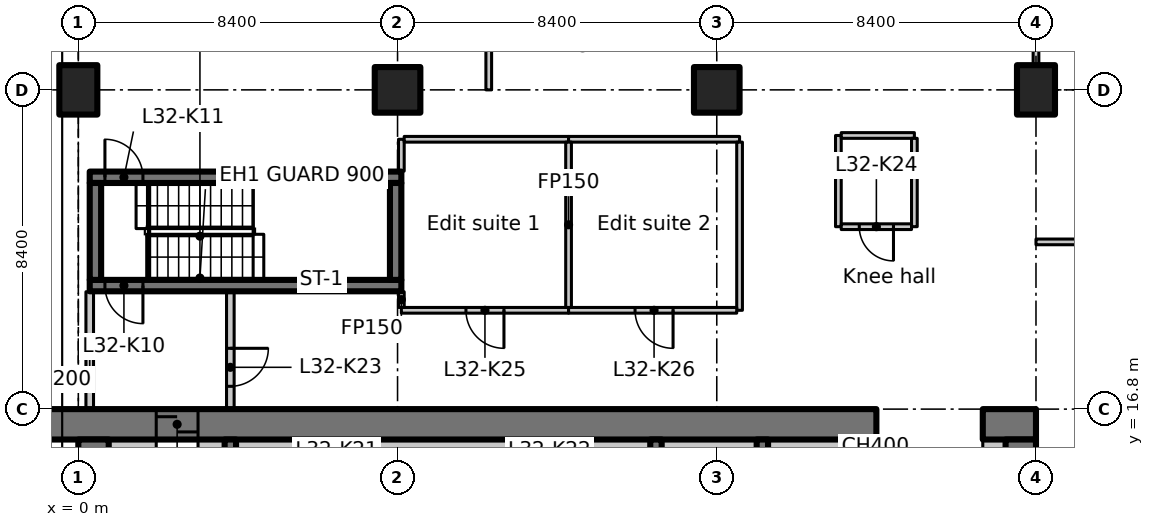
"""IFC4 building model, lengths in metres.
Left out: names, types, materials, properties, quantities, classifications, styles, units other than length and angle.
Written with IfcOpenShell. Run it as: python <this file> out.ifc"""

import sys

from ifc_helpers import new_model, si_unit, direction, frame, frame_2d, origin, origin_2d, place, context, subcontext, project, spatial, polyline, rectangle, outline, extrude, element, fill, save


model = new_model("IFC4")
c1 = context("Model", 3, precision=1e-05, world=origin(), true_north=direction((0.0, 1.0)))
c2 = subcontext(c1, "Body", "Model", "MODEL_VIEW")
j1 = project(units=[si_unit("LENGTHUNIT", "METRE"), si_unit("PLANEANGLEUNIT", "RADIAN")], contexts=[c1])
p1 = place(None, origin())
s1 = spatial("IfcSite", under=j1, at=p1, CompositionType="ELEMENT")
p2 = place(p1, origin())
s2 = spatial("IfcBuilding", under=s1, at=p2, CompositionType="ELEMENT")
p3 = place(p2, frame((0.0, 0.0, 131.3)))
s3 = spatial("IfcBuildingStorey", under=s2, at=p3, CompositionType="ELEMENT", Elevation=131.3)
p4 = place(p3, frame((0.0, 25.2, 0.0), z_axis=(0.0, 0.0, 1.0), x_axis=(1.0, 0.0, 0.0)))
e1 = element("IfcColumn", 1, at=p4, inside=s3, PredefinedType="COLUMN", context=c2, shape_type="SweptSolid", body=[
    extrude(rectangle(XDim=1.0, YDim=1.3, at=origin_2d()), origin(), (0.0, 0.0, 1.0), 3.35),
])
for number, where, z_axis, x_axis in (
    (2, (8.4, 25.2, 0.0), (0.0, 0.0, 1.0), (1.0, 0.0, 0.0)),
    (3, (16.8, 25.2, 0.0), (0.0, 0.0, 1.0), (1.0, 0.0, 0.0)),
):
    element("IfcColumn", number, at=place(p3, frame(where, z_axis=z_axis, x_axis=x_axis)), inside=s3, PredefinedType="COLUMN", context=c2, shape_type="SweptSolid", body=[
        extrude(rectangle(XDim=1.2, YDim=1.2, at=origin_2d()), origin(), (0.0, 0.0, 1.0), 3.35),
    ])
p5 = place(p3, frame((25.2, 25.2, 0.0), z_axis=(0.0, 0.0, 1.0), x_axis=(1.0, 0.0, 0.0)))
e4 = element("IfcColumn", 4, at=p5, inside=s3, PredefinedType="COLUMN", context=c2, shape_type="SweptSolid", body=[
    extrude(rectangle(XDim=1.0, YDim=1.3, at=origin_2d()), origin(), (0.0, 0.0, 1.0), 3.35),
])
p6 = place(p3, frame((-1.1, 16.4, 0.0), z_axis=(0.0, 0.0, 1.0), x_axis=(1.0, 0.0, 0.0)))
e5 = element("IfcWall", 5, at=p6, inside=s3, PredefinedType="SHEAR", context=c2, shape_type="SweptSolid", body=[
    extrude(rectangle(XDim=22.1, YDim=0.8, at=frame_2d((11.05, 0.0))), origin(), (0.0, 0.0, 1.0), 3.35),
])
p7 = place(p6, frame((3.15, 0.0, 0.0)))
e6 = element("IfcOpeningElement", 6, at=p7, cuts=e5, PredefinedType="OPENING", context=c2, shape_type="SweptSolid", body=[
    extrude(rectangle(XDim=1.1, YDim=2.3, at=frame_2d((0.55, 1.15))), frame((0.0, 0.41, 0.0), z_axis=(0.0, -1.0, 0.0), x_axis=(1.0, 0.0, 0.0)), (0.0, 0.0, 1.0), 0.82),
])
p8 = place(p3, frame((23.8, 16.4, 0.0), z_axis=(0.0, 0.0, 1.0), x_axis=(1.0, 0.0, 0.0)))
e7 = element("IfcWall", 7, at=p8, inside=s3, PredefinedType="SHEAR", context=c2, shape_type="SweptSolid", body=[
    extrude(rectangle(XDim=1.4, YDim=0.8, at=frame_2d((0.7, 0.0))), origin(), (0.0, 0.0, 1.0), 3.35),
])
p9 = place(p3, frame((0.4, 7.136, 0.0), z_axis=(0.0, 0.0, 1.0), x_axis=(0.0, 1.0, 0.0)))
e8 = element("IfcWall", 8, at=p9, inside=s3, PredefinedType="SHEAR", context=c2, shape_type="SweptSolid", body=[
    extrude(rectangle(XDim=8.864, YDim=0.8, at=frame_2d((4.432, 0.0))), origin(), (0.0, 0.0, 1.0), 3.35),
])
p10 = place(p3, frame((24.8, 12.6, 0.0), z_axis=(0.0, 0.0, 1.0), x_axis=(0.0, 1.0, 0.0)))
e9 = element("IfcWall", 9, at=p10, inside=s3, PredefinedType="SHEAR", context=c2, shape_type="SweptSolid", body=[
    extrude(rectangle(XDim=3.4, YDim=0.8, at=frame_2d((1.7, 0.0))), origin(), (0.0, 0.0, 1.0), 3.35),
])
p11 = place(p3, frame((0.8, 15.8, 0.0), z_axis=(0.0, 0.0, 1.0), x_axis=(1.0, 0.0, 0.0)))
e10 = element("IfcWall", 10, at=p11, inside=s3, PredefinedType="PARTITIONING", context=c2, shape_type="SweptSolid", body=[
    extrude(rectangle(XDim=1.25, YDim=0.4, at=frame_2d((0.625, 0.0))), origin(), (0.0, 0.0, 1.0), 3.35),
])
p12 = place(p3, frame((23.8, 15.8, 0.0), z_axis=(0.0, 0.0, 1.0), x_axis=(1.0, 0.0, 0.0)))
e11 = element("IfcWall", 11, at=p12, inside=s3, PredefinedType="PARTITIONING", context=c2, shape_type="SweptSolid", body=[
    extrude(rectangle(XDim=0.6, YDim=0.4, at=frame_2d((0.3, 0.0))), origin(), (0.0, 0.0, 1.0), 3.35),
])
for number, where, z_axis, x_axis in (
    (12, (4.0, 12.95, 0.0), (0.0, 0.0, 1.0), (0.0, 1.0, 0.0)),
    (13, (15.2, 12.95, 0.0), (0.0, 0.0, 1.0), (0.0, 1.0, 0.0)),
    (14, (18.0, 12.95, 0.0), (0.0, 0.0, 1.0), (0.0, 1.0, 0.0)),
    (15, (20.8, 12.95, 0.0), (0.0, 0.0, 1.0), (0.0, 1.0, 0.0)),
):
    element("IfcWall", number, at=place(p3, frame(where, z_axis=z_axis, x_axis=x_axis)), inside=s3, PredefinedType="SHEAR", context=c2, shape_type="SweptSolid", body=[
        extrude(rectangle(XDim=3.05, YDim=0.3, at=frame_2d((1.525, 0.0))), origin(), (0.0, 0.0, 1.0), 3.35),
    ])
p13 = place(p3, frame((8.5, 20.05, 0.0), z_axis=(0.0, 0.0, 1.0), x_axis=(-1.0, 0.0, 0.0)))
e16 = element("IfcWall", 16, at=p13, inside=s3, PredefinedType="SHEAR", context=c2, shape_type="SweptSolid", body=[
    extrude(rectangle(XDim=8.2, YDim=0.3, at=frame_2d((4.1, 0.0))), origin(), (0.0, 0.0, 1.0), 3.35),
])
p14 = place(p13, frame((6.8, 0.0, 0.0)))
e17 = element("IfcOpeningElement", 17, at=p14, cuts=e16, PredefinedType="OPENING", context=c2, shape_type="SweptSolid", body=[
    extrude(rectangle(XDim=1.0, YDim=2.1, at=frame_2d((0.5, 1.05))), frame((0.0, 0.16, 0.0), z_axis=(0.0, -1.0, 0.0), x_axis=(1.0, 0.0, 0.0)), (0.0, 0.0, 1.0), 0.32),
])
p15 = place(p3, frame((0.3, 22.9, 0.0), z_axis=(0.0, 0.0, 1.0), x_axis=(1.0, 0.0, 0.0)))
e18 = element("IfcWall", 18, at=p15, inside=s3, PredefinedType="SHEAR", context=c2, shape_type="SweptSolid", body=[
    extrude(rectangle(XDim=8.2, YDim=0.3, at=frame_2d((4.1, 0.0))), origin(), (0.0, 0.0, 1.0), 3.35),
])
p16 = place(p15, frame((0.4, 0.0, 0.0)))
e19 = element("IfcOpeningElement", 19, at=p16, cuts=e18, PredefinedType="OPENING", context=c2, shape_type="SweptSolid", body=[
    extrude(rectangle(XDim=1.0, YDim=2.1, at=frame_2d((0.5, 1.05))), frame((0.0, 0.16, 0.0), z_axis=(0.0, -1.0, 0.0), x_axis=(1.0, 0.0, 0.0)), (0.0, 0.0, 1.0), 0.32),
])
for number, where, z_axis, x_axis in (
    (20, (0.45, 20.2, 0.0), (0.0, 0.0, 1.0), (0.0, 1.0, 0.0)),
    (21, (8.35, 20.2, 0.0), (0.0, 0.0, 1.0), (0.0, 1.0, 0.0)),
):
    element("IfcWall", number, at=place(p3, frame(where, z_axis=z_axis, x_axis=x_axis)), inside=s3, PredefinedType="SHEAR", context=c2, shape_type="SweptSolid", body=[
        extrude(rectangle(XDim=2.55, YDim=0.3, at=frame_2d((1.275, 0.0))), origin(), (0.0, 0.0, 1.0), 3.35),
    ])
p17 = place(p3, frame((0.3, 16.812, 0.0), z_axis=(0.0, 0.0, 1.0), x_axis=(0.0, 1.0, 0.0)))
e22 = element("IfcWall", 22, at=p17, inside=s3, PredefinedType="PARTITIONING", context=c2, shape_type="SweptSolid", body=[
    extrude(rectangle(XDim=3.076, YDim=0.2, at=frame_2d((1.538, 0.0))), origin(), (0.0, 0.0, 1.0), 2.98),
])
p18 = place(p3, frame((4.0, 19.888, 0.0), z_axis=(0.0, 0.0, 1.0), x_axis=(0.0, -1.0, 0.0)))
e23 = element("IfcWall", 23, at=p18, inside=s3, PredefinedType="PARTITIONING", context=c2, shape_type="SweptSolid", body=[
    extrude(rectangle(XDim=3.076, YDim=0.2, at=frame_2d((1.538, 0.0))), origin(), (0.0, 0.0, 1.0), 3.35),
])
p19 = place(p18, frame((1.488, 0.0, 0.0)))
e24 = element("IfcOpeningElement", 24, at=p19, cuts=e23, PredefinedType="OPENING", context=c2, shape_type="SweptSolid", body=[
    extrude(rectangle(XDim=1.0, YDim=2.1, at=frame_2d((0.5, 1.05))), frame((0.0, 0.11, 0.0), z_axis=(0.0, -1.0, 0.0), x_axis=(1.0, 0.0, 0.0)), (0.0, 0.0, 1.0), 0.22),
])
p20 = place(p3, frame((12.9, 19.4, 0.0), z_axis=(0.0, 0.0, 1.0), x_axis=(-1.0, 0.0, 0.0)))
e25 = element("IfcWall", 25, at=p20, inside=s3, PredefinedType="PARTITIONING", context=c2, shape_type="SweptSolid", body=[
    extrude(rectangle(XDim=4.4, YDim=0.15, at=frame_2d((2.2, 0.0))), origin(), (0.0, 0.0, 1.0), 3.35),
])
p21 = place(p20, frame((1.7, 0.0, 0.0)))
e26 = element("IfcOpeningElement", 26, at=p21, cuts=e25, PredefinedType="OPENING", context=c2, shape_type="SweptSolid", body=[
    extrude(rectangle(XDim=1.0, YDim=2.1, at=frame_2d((0.5, 1.05))), frame((0.0, 0.085, 0.0), z_axis=(0.0, -1.0, 0.0), x_axis=(1.0, 0.0, 0.0)), (0.0, 0.0, 1.0), 0.17),
])
p22 = place(p3, frame((8.5, 19.475, 0.0), z_axis=(0.0, 0.0, 1.0), x_axis=(0.0, 1.0, 0.0)))
e27 = element("IfcWall", 27, at=p22, inside=s3, PredefinedType="PARTITIONING", context=c2, shape_type="SweptSolid", body=[
    extrude(rectangle(XDim=0.413, YDim=0.15, at=frame_2d((0.207, 0.0))), origin(), (0.0, 0.0, 1.0), 3.35),
])
p23 = place(p3, frame((8.5, 23.062, 0.0), z_axis=(0.0, 0.0, 1.0), x_axis=(0.0, 1.0, 0.0)))
e28 = element("IfcWall", 28, at=p23, inside=s3, PredefinedType="PARTITIONING", context=c2, shape_type="SweptSolid", body=[
    extrude(rectangle(XDim=0.838, YDim=0.15, at=frame_2d((0.419, 0.0))), origin(), (0.0, 0.0, 1.0), 3.35),
])
p24 = place(p3, frame((8.575, 23.9, 0.0), z_axis=(0.0, 0.0, 1.0), x_axis=(1.0, 0.0, 0.0)))
e29 = element("IfcWall", 29, at=p24, inside=s3, PredefinedType="PARTITIONING", context=c2, shape_type="SweptSolid", body=[
    extrude(rectangle(XDim=4.325, YDim=0.15, at=frame_2d((2.163, 0.0))), origin(), (0.0, 0.0, 1.0), 3.35),
])
p25 = place(p3, frame((12.9, 23.9, 0.0), z_axis=(0.0, 0.0, 1.0), x_axis=(1.0, 0.0, 0.0)))
e30 = element("IfcWall", 30, at=p25, inside=s3, PredefinedType="PARTITIONING", context=c2, shape_type="SweptSolid", body=[
    extrude(rectangle(XDim=4.5, YDim=0.15, at=frame_2d((2.25, 0.0))), origin(), (0.0, 0.0, 1.0), 3.35),
])
p26 = place(p3, frame((17.4, 23.825, 0.0), z_axis=(0.0, 0.0, 1.0), x_axis=(0.0, -1.0, 0.0)))
e31 = element("IfcWall", 31, at=p26, inside=s3, PredefinedType="PARTITIONING", context=c2, shape_type="SweptSolid", body=[
    extrude(rectangle(XDim=4.425, YDim=0.15, at=frame_2d((2.212, 0.0))), origin(), (0.0, 0.0, 1.0), 3.35),
])
p27 = place(p3, frame((17.325, 19.4, 0.0), z_axis=(0.0, 0.0, 1.0), x_axis=(-1.0, 0.0, 0.0)))
e32 = element("IfcWall", 32, at=p27, inside=s3, PredefinedType="PARTITIONING", context=c2, shape_type="SweptSolid", body=[
    extrude(rectangle(XDim=4.425, YDim=0.15, at=frame_2d((2.212, 0.0))), origin(), (0.0, 0.0, 1.0), 3.35),
])
p28 = place(p27, frame((1.675, 0.0, 0.0)))
e33 = element("IfcOpeningElement", 33, at=p28, cuts=e32, PredefinedType="OPENING", context=c2, shape_type="SweptSolid", body=[
    extrude(rectangle(XDim=1.0, YDim=2.1, at=frame_2d((0.5, 1.05))), frame((0.0, 0.085, 0.0), z_axis=(0.0, -1.0, 0.0), x_axis=(1.0, 0.0, 0.0)), (0.0, 0.0, 1.0), 0.17),
])
p29 = place(p3, frame((12.9, 23.825, 0.0), z_axis=(0.0, 0.0, 1.0), x_axis=(0.0, -1.0, 0.0)))
e34 = element("IfcWall", 34, at=p29, inside=s3, PredefinedType="PARTITIONING", context=c2, shape_type="SweptSolid", body=[
    extrude(rectangle(XDim=4.35, YDim=0.15, at=frame_2d((2.175, 0.0))), origin(), (0.0, 0.0, 1.0), 3.35),
])
p30 = place(p3, frame((20.0, 21.6, 0.0), z_axis=(0.0, 0.0, 1.0), x_axis=(0.0, 1.0, 0.0)))
e35 = element("IfcWall", 35, at=p30, inside=s3, PredefinedType="PARTITIONING", context=c2, shape_type="SweptSolid", body=[
    extrude(rectangle(XDim=2.4, YDim=0.15, at=frame_2d((1.2, 0.0))), origin(), (0.0, 0.0, 1.0), 3.35),
])
p31 = place(p3, frame((20.075, 24.0, 0.0), z_axis=(0.0, 0.0, 1.0), x_axis=(1.0, 0.0, 0.0)))
e36 = element("IfcWall", 36, at=p31, inside=s3, PredefinedType="PARTITIONING", context=c2, shape_type="SweptSolid", body=[
    extrude(rectangle(XDim=1.925, YDim=0.15, at=frame_2d((0.962, 0.0))), origin(), (0.0, 0.0, 1.0), 3.35),
])
p32 = place(p3, frame((22.0, 23.925, 0.0), z_axis=(0.0, 0.0, 1.0), x_axis=(0.0, -1.0, 0.0)))
e37 = element("IfcWall", 37, at=p32, inside=s3, PredefinedType="PARTITIONING", context=c2, shape_type="SweptSolid", body=[
    extrude(rectangle(XDim=2.325, YDim=0.15, at=frame_2d((1.163, 0.0))), origin(), (0.0, 0.0, 1.0), 3.35),
])
p33 = place(p3, frame((21.925, 21.6, 0.0), z_axis=(0.0, 0.0, 1.0), x_axis=(-1.0, 0.0, 0.0)))
e38 = element("IfcWall", 38, at=p33, inside=s3, PredefinedType="PARTITIONING", context=c2, shape_type="SweptSolid", body=[
    extrude(rectangle(XDim=1.85, YDim=0.15, at=frame_2d((0.925, 0.0))), origin(), (0.0, 0.0, 1.0), 3.35),
])
p34 = place(p33, frame((0.475, 0.0, 0.0)))
e39 = element("IfcOpeningElement", 39, at=p34, cuts=e38, PredefinedType="OPENING", context=c2, shape_type="SweptSolid", body=[
    extrude(rectangle(XDim=0.9, YDim=2.1, at=frame_2d((0.45, 1.05))), frame((0.0, 0.085, 0.0), z_axis=(0.0, -1.0, 0.0), x_axis=(1.0, 0.0, 0.0)), (0.0, 0.0, 1.0), 0.17),
])
p35 = place(p3, frame((3.15, 15.8, 0.0), z_axis=(0.0, 0.0, 1.0), x_axis=(1.0, 0.0, 0.0)))
e40 = element("IfcWall", 40, at=p35, inside=s3, PredefinedType="PARTITIONING", context=c2, shape_type="SweptSolid", body=[
    extrude(rectangle(XDim=0.7, YDim=0.4, at=frame_2d((0.35, 0.0))), origin(), (0.0, 0.0, 1.0), 3.35),
])
p36 = place(p3, frame((4.15, 15.8, 0.0), z_axis=(0.0, 0.0, 1.0), x_axis=(1.0, 0.0, 0.0)))
e41 = element("IfcWall", 41, at=p36, inside=s3, PredefinedType="PARTITIONING", context=c2, shape_type="SweptSolid", body=[
    extrude(rectangle(XDim=10.9, YDim=0.4, at=frame_2d((5.45, 0.0))), origin(), (0.0, 0.0, 1.0), 3.35),
])
for number, where, z_axis, x_axis in (
    (42, (15.35, 15.8, 0.0), (0.0, 0.0, 1.0), (1.0, 0.0, 0.0)),
    (43, (18.15, 15.8, 0.0), (0.0, 0.0, 1.0), (1.0, 0.0, 0.0)),
):
    element("IfcWall", number, at=place(p3, frame(where, z_axis=z_axis, x_axis=x_axis)), inside=s3, PredefinedType="PARTITIONING", context=c2, shape_type="SweptSolid", body=[
        extrude(rectangle(XDim=2.5, YDim=0.4, at=frame_2d((1.25, 0.0))), origin(), (0.0, 0.0, 1.0), 3.35),
    ])
p37 = place(p3, frame((20.95, 15.8, 0.0), z_axis=(0.0, 0.0, 1.0), x_axis=(1.0, 0.0, 0.0)))
e44 = element("IfcWall", 44, at=p37, inside=s3, PredefinedType="PARTITIONING", context=c2, shape_type="SweptSolid", body=[
    extrude(rectangle(XDim=0.05, YDim=0.4, at=frame_2d((0.025, 0.0))), origin(), (0.0, 0.0, 1.0), 3.35),
])
p38 = place(p3, frame((25.2, 21.2, 0.0), z_axis=(0.0, 0.0, 1.0), x_axis=(1.0, 0.0, 0.0)))
e45 = element("IfcWall", 45, at=p38, inside=s3, PredefinedType="PARTITIONING", context=c2, shape_type="SweptSolid", body=[
    extrude(rectangle(XDim=4.2, YDim=0.15, at=frame_2d((2.1, 0.0))), origin(), (0.0, 0.0, 1.0), 3.33),
])
p39 = place(p3, frame((25.2, 31.0, 0.0), z_axis=(0.0, 0.0, 1.0), x_axis=(0.0, -1.0, 0.0)))
e46 = element("IfcWall", 46, at=p39, inside=s3, PredefinedType="PARTITIONING", context=c2, shape_type="SweptSolid", body=[
    extrude(outline(polyline([(0.0, 0.0), (5.13, 0.0), (5.13, 2.98), (0.0, 2.98), (0.0, 0.0)])), frame((0.0, 0.075, 0.0), z_axis=(0.0, -1.0, 0.0), x_axis=(1.0, 0.0, 0.0)), (0.0, 0.0, 1.0), 0.15),
])
p40 = place(p39, frame((1.93, 0.0, 0.0)))
e47 = element("IfcOpeningElement", 47, at=p40, cuts=e46, PredefinedType="OPENING", context=c2, shape_type="SweptSolid", body=[
    extrude(rectangle(XDim=1.1, YDim=2.1, at=frame_2d((0.55, 1.05))), frame((0.0, 0.085, 0.0), z_axis=(0.0, -1.0, 0.0), x_axis=(1.0, 0.0, 0.0)), (0.0, 0.0, 1.0), 0.17),
])
p41 = place(p3, frame((10.8, 25.2, 0.0), z_axis=(0.0, 0.0, 1.0), x_axis=(0.0, 1.0, 0.0)))
e48 = element("IfcWall", 48, at=p41, inside=s3, PredefinedType="PARTITIONING", context=c2, shape_type="SweptSolid", body=[
    extrude(rectangle(XDim=8.4, YDim=0.15, at=frame_2d((4.2, 0.0))), origin(), (0.0, 0.0, 1.0), 3.33),
])
p42 = place(p41, frame((3.3, 0.0, 0.0)))
e49 = element("IfcOpeningElement", 49, at=p42, cuts=e48, PredefinedType="OPENING", context=c2, shape_type="SweptSolid", body=[
    extrude(rectangle(XDim=1.6, YDim=2.1, at=frame_2d((0.8, 1.05))), frame((0.0, 0.085, 0.0), z_axis=(0.0, -1.0, 0.0), x_axis=(1.0, 0.0, 0.0)), (0.0, 0.0, 1.0), 0.17),
])
p43 = place(p7, origin())
e50 = element("IfcDoor", 50, at=p43, inside=s3, OperationType="SLIDING_TO_LEFT", PredefinedType="DOOR", context=c2, shape_type="SweptSolid", body=[
    extrude(rectangle(XDim=1.1, YDim=2.3, at=frame_2d((0.55, 1.15))), frame((0.0, 0.025, 0.0), z_axis=(0.0, -1.0, 0.0), x_axis=(1.0, 0.0, 0.0)), (0.0, 0.0, 1.0), 0.05),
])
fill(e6, e50)
p44 = place(p14, origin())
e51 = element("IfcDoor", 51, at=p44, inside=s3, OperationType="SINGLE_SWING_LEFT", PredefinedType="DOOR", context=c2, shape_type="SweptSolid", body=[
    extrude(rectangle(XDim=1.0, YDim=2.1, at=frame_2d((0.5, 1.05))), frame((0.0, 0.025, 0.0), z_axis=(0.0, -1.0, 0.0), x_axis=(1.0, 0.0, 0.0)), (0.0, 0.0, 1.0), 0.05),
])
fill(e17, e51)
p45 = place(p16, origin())
e52 = element("IfcDoor", 52, at=p45, inside=s3, OperationType="SINGLE_SWING_RIGHT", PredefinedType="DOOR", context=c2, shape_type="SweptSolid", body=[
    extrude(rectangle(XDim=1.0, YDim=2.1, at=frame_2d((0.5, 1.05))), frame((0.0, 0.025, 0.0), z_axis=(0.0, -1.0, 0.0), x_axis=(1.0, 0.0, 0.0)), (0.0, 0.0, 1.0), 0.05),
])
fill(e19, e52)
p46 = place(p19, origin())
e53 = element("IfcDoor", 53, at=p46, inside=s3, OperationType="SINGLE_SWING_RIGHT", PredefinedType="DOOR", context=c2, shape_type="SweptSolid", body=[
    extrude(rectangle(XDim=1.0, YDim=2.1, at=frame_2d((0.5, 1.05))), frame((0.0, 0.025, 0.0), z_axis=(0.0, -1.0, 0.0), x_axis=(1.0, 0.0, 0.0)), (0.0, 0.0, 1.0), 0.05),
])
fill(e24, e53)
p47 = place(p34, origin())
e54 = element("IfcDoor", 54, at=p47, inside=s3, OperationType="SINGLE_SWING_LEFT", PredefinedType="DOOR", context=c2, shape_type="SweptSolid", body=[
    extrude(rectangle(XDim=0.9, YDim=2.1, at=frame_2d((0.45, 1.05))), frame((0.0, 0.025, 0.0), z_axis=(0.0, -1.0, 0.0), x_axis=(1.0, 0.0, 0.0)), (0.0, 0.0, 1.0), 0.05),
])
fill(e39, e54)
p48 = place(p21, origin())
e55 = element("IfcDoor", 55, at=p48, inside=s3, OperationType="SINGLE_SWING_RIGHT", PredefinedType="DOOR", context=c2, shape_type="SweptSolid", body=[
    extrude(rectangle(XDim=1.0, YDim=2.1, at=frame_2d((0.5, 1.05))), frame((0.0, 0.025, 0.0), z_axis=(0.0, -1.0, 0.0), x_axis=(1.0, 0.0, 0.0)), (0.0, 0.0, 1.0), 0.05),
])
fill(e26, e55)
p49 = place(p28, origin())
e56 = element("IfcDoor", 56, at=p49, inside=s3, OperationType="SINGLE_SWING_LEFT", PredefinedType="DOOR", context=c2, shape_type="SweptSolid", body=[
    extrude(rectangle(XDim=1.0, YDim=2.1, at=frame_2d((0.5, 1.05))), frame((0.0, 0.025, 0.0), z_axis=(0.0, -1.0, 0.0), x_axis=(1.0, 0.0, 0.0)), (0.0, 0.0, 1.0), 0.05),
])
fill(e33, e56)
save(model, sys.argv[1])
